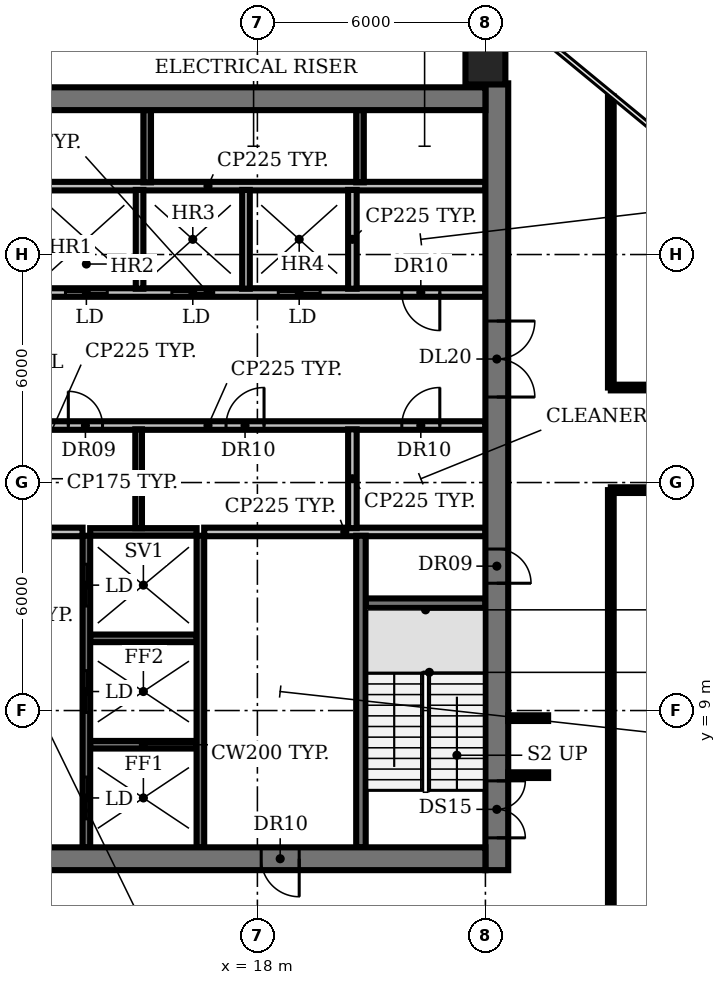
"""IFC4 building model, lengths in metres.
Left out: names, types, materials, properties, quantities, classifications, styles, units other than length and angle.
Written with IfcOpenShell. Run it as: python <this file> out.ifc"""

import sys

from ifc_helpers import new_model, si_unit, direction, frame, frame_2d, origin, origin_2d, place, context, subcontext, project, spatial, rectangle, circle, extrude, element, fill, save


model = new_model("IFC4")
c1 = context("Model", 3, precision=1e-05, world=origin(), true_north=direction((0.0, 1.0)))
c2 = subcontext(c1, "Body", "Model", "MODEL_VIEW")
j1 = project(units=[si_unit("LENGTHUNIT", "METRE"), si_unit("PLANEANGLEUNIT", "RADIAN")], contexts=[c1])
p1 = place(None, origin())
s1 = spatial("IfcSite", under=j1, at=p1, CompositionType="ELEMENT")
p2 = place(p1, origin())
s2 = spatial("IfcBuilding", under=s1, at=p2, CompositionType="ELEMENT")
p3 = place(p2, frame((0.0, 0.0, 192.8)))
s3 = spatial("IfcBuildingStorey", under=s2, at=p3, CompositionType="ELEMENT", Elevation=192.8)
p4 = place(p3, frame((24.0, 26.0, 0.0), z_axis=(0.0, 0.0, 1.0), x_axis=(1.0, 0.0, 0.0)))
e1 = element("IfcColumn", 1, at=p4, inside=s3, PredefinedType="COLUMN", context=c2, shape_type="SweptSolid", body=[
    extrude(circle(Radius=0.525, at=origin_2d()), origin(), (0.0, 0.0, 1.0), 3.2),
])
for number, where, z_axis, x_axis in (
    (2, (13.6, 8.1, 0.0), (0.0, 0.0, 1.0), (1.0, 0.0, 0.0)),
    (3, (13.6, 10.9, 0.0), (0.0, 0.0, 1.0), (1.0, 0.0, 0.0)),
):
    element("IfcWall", number, at=place(p3, frame(where, z_axis=z_axis, x_axis=x_axis)), inside=s3, PredefinedType="SHEAR", context=c2, shape_type="SweptSolid", body=[
        extrude(rectangle(XDim=2.8, YDim=0.2, at=frame_2d((1.4, 0.0))), origin(), (0.0, 0.0, 1.0), 3.8),
    ])
p5 = place(p3, frame((20.85, 11.825, 0.0), z_axis=(0.0, 0.0, 1.0), x_axis=(1.0, 0.0, 0.0)))
e4 = element("IfcWall", 4, at=p5, inside=s3, PredefinedType="SHEAR", context=c2, shape_type="SweptSolid", body=[
    extrude(rectangle(XDim=3.15, YDim=0.25, at=frame_2d((1.575, 0.0))), origin(), (0.0, 0.0, 1.0), 3.8),
])
p6 = place(p3, frame((9.4, 13.7, 0.0), z_axis=(0.0, 0.0, 1.0), x_axis=(1.0, 0.0, 0.0)))
e5 = element("IfcWall", 5, at=p6, inside=s3, PredefinedType="PARTITIONING", context=c2, shape_type="SweptSolid", body=[
    extrude(rectangle(XDim=4.0, YDim=0.225, at=frame_2d((2.0, 0.0))), origin(), (0.0, 0.0, 1.0), 3.8),
])
p7 = place(p3, frame((13.6, 13.7, 0.0), z_axis=(0.0, 0.0, 1.0), x_axis=(1.0, 0.0, 0.0)))
e6 = element("IfcWall", 6, at=p7, inside=s3, PredefinedType="SHEAR", context=c2, shape_type="SweptSolid", body=[
    extrude(rectangle(XDim=2.8, YDim=0.2, at=frame_2d((1.4, 0.0))), origin(), (0.0, 0.0, 1.0), 3.8),
])
p8 = place(p3, frame((16.6, 13.7, 0.0), z_axis=(0.0, 0.0, 1.0), x_axis=(1.0, 0.0, 0.0)))
e7 = element("IfcWall", 7, at=p8, inside=s3, PredefinedType="PARTITIONING", context=c2, shape_type="SweptSolid", body=[
    extrude(rectangle(XDim=7.4, YDim=0.225, at=frame_2d((3.7, 0.0))), origin(), (0.0, 0.0, 1.0), 3.8),
])
p9 = place(p3, frame((9.4, 16.5, 0.0), z_axis=(0.0, 0.0, 1.0), x_axis=(1.0, 0.0, 0.0)))
e8 = element("IfcWall", 8, at=p9, inside=s3, PredefinedType="PARTITIONING", context=c2, shape_type="SweptSolid", body=[
    extrude(rectangle(XDim=14.6, YDim=0.225, at=frame_2d((7.3, 0.0))), origin(), (0.0, 0.0, 1.0), 3.8),
])
p10 = place(p9, frame((0.85, 0.0, 0.0)))
e9 = element("IfcOpeningElement", 9, at=p10, cuts=e8, PredefinedType="OPENING", context=c2, shape_type="SweptSolid", body=[
    extrude(rectangle(XDim=0.9, YDim=2.1, at=frame_2d((0.45, 1.05))), frame((0.0, 0.123, 0.0), z_axis=(0.0, -1.0, 0.0), x_axis=(1.0, 0.0, 0.0)), (0.0, 0.0, 1.0), 0.245),
])
p11 = place(p9, frame((3.625, 0.0, 0.0)))
e10 = element("IfcOpeningElement", 10, at=p11, cuts=e8, PredefinedType="OPENING", context=c2, shape_type="SweptSolid", body=[
    extrude(rectangle(XDim=0.9, YDim=2.1, at=frame_2d((0.45, 1.05))), frame((0.0, 0.123, 0.0), z_axis=(0.0, -1.0, 0.0), x_axis=(1.0, 0.0, 0.0)), (0.0, 0.0, 1.0), 0.245),
])
p12 = place(p9, frame((7.775, 0.0, 0.0)))
e11 = element("IfcOpeningElement", 11, at=p12, cuts=e8, PredefinedType="OPENING", context=c2, shape_type="SweptSolid", body=[
    extrude(rectangle(XDim=1.0, YDim=2.1, at=frame_2d((0.5, 1.05))), frame((0.0, 0.123, 0.0), z_axis=(0.0, -1.0, 0.0), x_axis=(1.0, 0.0, 0.0)), (0.0, 0.0, 1.0), 0.245),
])
p13 = place(p9, frame((12.4, 0.0, 0.0)))
e12 = element("IfcOpeningElement", 12, at=p13, cuts=e8, PredefinedType="OPENING", context=c2, shape_type="SweptSolid", body=[
    extrude(rectangle(XDim=1.0, YDim=2.1, at=frame_2d((0.5, 1.05))), frame((0.0, 0.123, 0.0), z_axis=(0.0, -1.0, 0.0), x_axis=(1.0, 0.0, 0.0)), (0.0, 0.0, 1.0), 0.245),
])
p14 = place(p3, frame((24.0, 20.0, 0.0), z_axis=(0.0, 0.0, 1.0), x_axis=(-1.0, 0.0, 0.0)))
e13 = element("IfcWall", 13, at=p14, inside=s3, PredefinedType="PARTITIONING", context=c2, shape_type="SweptSolid", body=[
    extrude(rectangle(XDim=14.6, YDim=0.225, at=frame_2d((7.3, 0.0))), origin(), (0.0, 0.0, 1.0), 3.8),
])
p15 = place(p14, frame((12.75, 0.0, 0.0)))
e14 = element("IfcOpeningElement", 14, at=p15, cuts=e13, PredefinedType="OPENING", context=c2, shape_type="SweptSolid", body=[
    extrude(rectangle(XDim=1.1, YDim=2.1, at=frame_2d((0.55, 1.05))), frame((0.0, 0.123, 0.0), z_axis=(0.0, -1.0, 0.0), x_axis=(1.0, 0.0, 0.0)), (0.0, 0.0, 1.0), 0.245),
])
p16 = place(p14, frame((9.95, 0.0, 0.0)))
e15 = element("IfcOpeningElement", 15, at=p16, cuts=e13, PredefinedType="OPENING", context=c2, shape_type="SweptSolid", body=[
    extrude(rectangle(XDim=1.1, YDim=2.1, at=frame_2d((0.55, 1.05))), frame((0.0, 0.123, 0.0), z_axis=(0.0, -1.0, 0.0), x_axis=(1.0, 0.0, 0.0)), (0.0, 0.0, 1.0), 0.245),
])
p17 = place(p14, frame((7.15, 0.0, 0.0)))
e16 = element("IfcOpeningElement", 16, at=p17, cuts=e13, PredefinedType="OPENING", context=c2, shape_type="SweptSolid", body=[
    extrude(rectangle(XDim=1.1, YDim=2.1, at=frame_2d((0.55, 1.05))), frame((0.0, 0.123, 0.0), z_axis=(0.0, -1.0, 0.0), x_axis=(1.0, 0.0, 0.0)), (0.0, 0.0, 1.0), 0.245),
])
p18 = place(p14, frame((4.35, 0.0, 0.0)))
e17 = element("IfcOpeningElement", 17, at=p18, cuts=e13, PredefinedType="OPENING", context=c2, shape_type="SweptSolid", body=[
    extrude(rectangle(XDim=1.1, YDim=2.1, at=frame_2d((0.55, 1.05))), frame((0.0, 0.123, 0.0), z_axis=(0.0, -1.0, 0.0), x_axis=(1.0, 0.0, 0.0)), (0.0, 0.0, 1.0), 0.245),
])
p19 = place(p14, frame((1.2, 0.0, 0.0)))
e18 = element("IfcOpeningElement", 18, at=p19, cuts=e13, PredefinedType="OPENING", context=c2, shape_type="SweptSolid", body=[
    extrude(rectangle(XDim=1.0, YDim=2.1, at=frame_2d((0.5, 1.05))), frame((0.0, 0.123, 0.0), z_axis=(0.0, -1.0, 0.0), x_axis=(1.0, 0.0, 0.0)), (0.0, 0.0, 1.0), 0.245),
])
p20 = place(p3, frame((9.4, 22.8, 0.0), z_axis=(0.0, 0.0, 1.0), x_axis=(1.0, 0.0, 0.0)))
e19 = element("IfcWall", 19, at=p20, inside=s3, PredefinedType="PARTITIONING", context=c2, shape_type="SweptSolid", body=[
    extrude(rectangle(XDim=14.6, YDim=0.225, at=frame_2d((7.3, 0.0))), origin(), (0.0, 0.0, 1.0), 3.8),
])
p21 = place(p3, frame((13.5, 5.4, 0.0), z_axis=(0.0, 0.0, 1.0), x_axis=(0.0, 1.0, 0.0)))
e20 = element("IfcWall", 20, at=p21, inside=s3, PredefinedType="SHEAR", context=c2, shape_type="SweptSolid", body=[
    extrude(rectangle(XDim=8.2, YDim=0.2, at=frame_2d((4.1, 0.0))), origin(), (0.0, 0.0, 1.0), 3.8),
])
p22 = place(p21, frame((0.75, 0.0, 0.0)))
e21 = element("IfcOpeningElement", 21, at=p22, cuts=e20, PredefinedType="OPENING", context=c2, shape_type="SweptSolid", body=[
    extrude(rectangle(XDim=1.1, YDim=2.1, at=frame_2d((0.55, 1.05))), frame((0.0, 0.11, 0.0), z_axis=(0.0, -1.0, 0.0), x_axis=(1.0, 0.0, 0.0)), (0.0, 0.0, 1.0), 0.22),
])
p23 = place(p21, frame((3.55, 0.0, 0.0)))
e22 = element("IfcOpeningElement", 22, at=p23, cuts=e20, PredefinedType="OPENING", context=c2, shape_type="SweptSolid", body=[
    extrude(rectangle(XDim=1.1, YDim=2.1, at=frame_2d((0.55, 1.05))), frame((0.0, 0.11, 0.0), z_axis=(0.0, -1.0, 0.0), x_axis=(1.0, 0.0, 0.0)), (0.0, 0.0, 1.0), 0.22),
])
p24 = place(p21, frame((6.35, 0.0, 0.0)))
e23 = element("IfcOpeningElement", 23, at=p24, cuts=e20, PredefinedType="OPENING", context=c2, shape_type="SweptSolid", body=[
    extrude(rectangle(XDim=1.1, YDim=2.1, at=frame_2d((0.55, 1.05))), frame((0.0, 0.11, 0.0), z_axis=(0.0, -1.0, 0.0), x_axis=(1.0, 0.0, 0.0)), (0.0, 0.0, 1.0), 0.22),
])
p25 = place(p3, frame((14.875, 13.8, 0.0), z_axis=(0.0, 0.0, 1.0), x_axis=(0.0, 1.0, 0.0)))
e24 = element("IfcWall", 24, at=p25, inside=s3, PredefinedType="PARTITIONING", context=c2, shape_type="SweptSolid", body=[
    extrude(rectangle(XDim=2.6, YDim=0.175, at=frame_2d((1.3, 0.0))), origin(), (0.0, 0.0, 1.0), 3.8),
])
p26 = place(p3, frame((14.9, 20.1, 0.0), z_axis=(0.0, 0.0, 1.0), x_axis=(0.0, 1.0, 0.0)))
e25 = element("IfcWall", 25, at=p26, inside=s3, PredefinedType="SOLIDWALL", context=c2, shape_type="SweptSolid", body=[
    extrude(rectangle(XDim=2.6, YDim=0.2, at=frame_2d((1.3, 0.0))), origin(), (0.0, 0.0, 1.0), 3.8),
])
p27 = place(p3, frame((15.1, 22.9, 0.0), z_axis=(0.0, 0.0, 1.0), x_axis=(0.0, 1.0, 0.0)))
e26 = element("IfcWall", 26, at=p27, inside=s3, PredefinedType="SHEAR", context=c2, shape_type="SweptSolid", body=[
    extrude(rectangle(XDim=1.9, YDim=0.2, at=frame_2d((0.95, 0.0))), origin(), (0.0, 0.0, 1.0), 3.8),
])
p28 = place(p3, frame((16.5, 5.4, 0.0), z_axis=(0.0, 0.0, 1.0), x_axis=(0.0, 1.0, 0.0)))
e27 = element("IfcWall", 27, at=p28, inside=s3, PredefinedType="SHEAR", context=c2, shape_type="SweptSolid", body=[
    extrude(rectangle(XDim=8.2, YDim=0.2, at=frame_2d((4.1, 0.0))), origin(), (0.0, 0.0, 1.0), 3.8),
])
p29 = place(p3, frame((17.7, 20.1, 0.0), z_axis=(0.0, 0.0, 1.0), x_axis=(0.0, 1.0, 0.0)))
e28 = element("IfcWall", 28, at=p29, inside=s3, PredefinedType="SOLIDWALL", context=c2, shape_type="SweptSolid", body=[
    extrude(rectangle(XDim=2.6, YDim=0.2, at=frame_2d((1.3, 0.0))), origin(), (0.0, 0.0, 1.0), 3.8),
])
for number, where, z_axis, x_axis in (
    (29, (20.5, 13.8, 0.0), (0.0, 0.0, 1.0), (0.0, 1.0, 0.0)),
    (30, (20.5, 20.1, 0.0), (0.0, 0.0, 1.0), (0.0, 1.0, 0.0)),
):
    element("IfcWall", number, at=place(p3, frame(where, z_axis=z_axis, x_axis=x_axis)), inside=s3, PredefinedType="PARTITIONING", context=c2, shape_type="SweptSolid", body=[
        extrude(rectangle(XDim=2.6, YDim=0.225, at=frame_2d((1.3, 0.0))), origin(), (0.0, 0.0, 1.0), 3.8),
    ])
p30 = place(p3, frame((20.7, 22.9, 0.0), z_axis=(0.0, 0.0, 1.0), x_axis=(0.0, 1.0, 0.0)))
e31 = element("IfcWall", 31, at=p30, inside=s3, PredefinedType="SHEAR", context=c2, shape_type="SweptSolid", body=[
    extrude(rectangle(XDim=1.9, YDim=0.2, at=frame_2d((0.95, 0.0))), origin(), (0.0, 0.0, 1.0), 3.8),
])
p31 = place(p3, frame((20.725, 5.4, 0.0), z_axis=(0.0, 0.0, 1.0), x_axis=(0.0, 1.0, 0.0)))
e32 = element("IfcWall", 32, at=p31, inside=s3, PredefinedType="SHEAR", context=c2, shape_type="SweptSolid", body=[
    extrude(rectangle(XDim=8.2, YDim=0.25, at=frame_2d((4.1, 0.0))), origin(), (0.0, 0.0, 1.0), 3.8),
])
p32 = place(p3, frame((24.3, 25.505, 0.0), z_axis=(0.0, 0.0, 1.0), x_axis=(0.0, -1.0, 0.0)))
e33 = element("IfcWall", 33, at=p32, inside=s3, PredefinedType="SHEAR", context=c2, shape_type="SweptSolid", body=[
    extrude(rectangle(XDim=20.705, YDim=0.6, at=frame_2d((10.353, 0.0))), origin(), (0.0, 0.0, 1.0), 3.8),
])
p33 = place(p32, frame((18.355, 0.0, 0.0)))
e34 = element("IfcOpeningElement", 34, at=p33, cuts=e33, PredefinedType="OPENING", context=c2, shape_type="SweptSolid", body=[
    extrude(rectangle(XDim=1.5, YDim=2.1, at=frame_2d((0.75, 1.05))), frame((0.0, 0.31, 0.0), z_axis=(0.0, -1.0, 0.0), x_axis=(1.0, 0.0, 0.0)), (0.0, 0.0, 1.0), 0.62),
])
p34 = place(p32, frame((12.255, 0.0, 0.0)))
e35 = element("IfcOpeningElement", 35, at=p34, cuts=e33, PredefinedType="OPENING", context=c2, shape_type="SweptSolid", body=[
    extrude(rectangle(XDim=0.9, YDim=2.1, at=frame_2d((0.45, 1.05))), frame((0.0, 0.31, 0.0), z_axis=(0.0, -1.0, 0.0), x_axis=(1.0, 0.0, 0.0)), (0.0, 0.0, 1.0), 0.62),
])
p35 = place(p32, frame((6.255, 0.0, 0.0)))
e36 = element("IfcOpeningElement", 36, at=p35, cuts=e33, PredefinedType="OPENING", context=c2, shape_type="SweptSolid", body=[
    extrude(rectangle(XDim=2.0, YDim=2.1, at=frame_2d((1.0, 1.05))), frame((0.0, 0.31, 0.0), z_axis=(0.0, -1.0, 0.0), x_axis=(1.0, 0.0, 0.0)), (0.0, 0.0, 1.0), 0.62),
])
p36 = place(p3, frame((24.0, 5.1, 0.0), z_axis=(0.0, 0.0, 1.0), x_axis=(-1.0, 0.0, 0.0)))
e37 = element("IfcWall", 37, at=p36, inside=s3, PredefinedType="SHEAR", context=c2, shape_type="SweptSolid", body=[
    extrude(rectangle(XDim=18.0, YDim=0.6, at=frame_2d((9.0, 0.0))), origin(), (0.0, 0.0, 1.0), 3.8),
])
p37 = place(p36, frame((13.0, 0.0, 0.0)))
e38 = element("IfcOpeningElement", 38, at=p37, cuts=e37, PredefinedType="OPENING", context=c2, shape_type="SweptSolid", body=[
    extrude(rectangle(XDim=1.2, YDim=2.1, at=frame_2d((0.6, 1.05))), frame((0.0, 0.31, 0.0), z_axis=(0.0, -1.0, 0.0), x_axis=(1.0, 0.0, 0.0)), (0.0, 0.0, 1.0), 0.62),
])
p38 = place(p36, frame((4.9, 0.0, 0.0)))
e39 = element("IfcOpeningElement", 39, at=p38, cuts=e37, PredefinedType="OPENING", context=c2, shape_type="SweptSolid", body=[
    extrude(rectangle(XDim=1.0, YDim=2.1, at=frame_2d((0.5, 1.05))), frame((0.0, 0.31, 0.0), z_axis=(0.0, -1.0, 0.0), x_axis=(1.0, 0.0, 0.0)), (0.0, 0.0, 1.0), 0.62),
])
p39 = place(p3, frame((6.0, 25.1, 0.0), z_axis=(0.0, 0.0, 1.0), x_axis=(1.0, 0.0, 0.0)))
e40 = element("IfcWall", 40, at=p39, inside=s3, PredefinedType="SHEAR", context=c2, shape_type="SweptSolid", body=[
    extrude(rectangle(XDim=18.0, YDim=0.6, at=frame_2d((9.0, 0.0))), origin(), (0.0, 0.0, 1.0), 3.8),
])
for number, where, z_axis, x_axis in (
    (41, (24.6, 7.3, 0.0), (0.0, 0.0, 1.0), (1.0, 0.0, 0.0)),
    (42, (24.6, 8.8, 0.0), (0.0, 0.0, 1.0), (1.0, 0.0, 0.0)),
):
    element("IfcWall", number, at=place(p3, frame(where, z_axis=z_axis, x_axis=x_axis)), inside=s3, PredefinedType="PARTITIONING", context=c2, shape_type="SweptSolid", body=[
        extrude(rectangle(XDim=1.05, YDim=0.15, at=frame_2d((0.525, 0.0))), origin(), (0.0, 0.0, 1.0), 2.83),
    ])
p40 = place(p3, frame((27.3, 0.9, 0.0), z_axis=(0.0, 0.0, 1.0), x_axis=(0.0, 1.0, 0.0)))
e43 = element("IfcWall", 43, at=p40, inside=s3, PredefinedType="PARTITIONING", context=c2, shape_type="SweptSolid", body=[
    extrude(rectangle(XDim=13.9, YDim=0.15, at=frame_2d((6.95, 0.0))), origin(), (0.0, 0.0, 1.0), 2.83),
])
p41 = place(p3, frame((27.3, 14.8, 0.0), z_axis=(0.0, 0.0, 1.0), x_axis=(1.0, 0.0, 0.0)))
e44 = element("IfcWall", 44, at=p41, inside=s3, PredefinedType="PARTITIONING", context=c2, shape_type="SweptSolid", body=[
    extrude(rectangle(XDim=17.055, YDim=0.15, at=frame_2d((8.527, 0.0))), origin(), (0.0, 0.0, 1.0), 2.83),
])
p42 = place(p41, frame((8.0, 0.0, 0.0)))
e45 = element("IfcOpeningElement", 45, at=p42, cuts=e44, PredefinedType="OPENING", context=c2, shape_type="SweptSolid", body=[
    extrude(rectangle(XDim=1.2, YDim=2.1, at=frame_2d((0.6, 1.05))), frame((0.0, 0.085, 0.0), z_axis=(0.0, -1.0, 0.0), x_axis=(1.0, 0.0, 0.0)), (0.0, 0.0, 1.0), 0.17),
])
p43 = place(p3, frame((27.3, 17.5, 0.0), z_axis=(0.0, 0.0, 1.0), x_axis=(0.0, 1.0, 0.0)))
e46 = element("IfcWall", 46, at=p43, inside=s3, PredefinedType="PARTITIONING", context=c2, shape_type="SweptSolid", body=[
    extrude(rectangle(XDim=7.66, YDim=0.15, at=frame_2d((3.83, 0.0))), origin(), (0.0, 0.0, 1.0), 2.83),
])
p44 = place(p3, frame((27.3, 17.5, 0.0), z_axis=(0.0, 0.0, 1.0), x_axis=(1.0, 0.0, 0.0)))
e47 = element("IfcWall", 47, at=p44, inside=s3, PredefinedType="PARTITIONING", context=c2, shape_type="SweptSolid", body=[
    extrude(rectangle(XDim=15.96, YDim=0.15, at=frame_2d((7.98, 0.0))), origin(), (0.0, 0.0, 1.0), 2.83),
])
p45 = place(p44, frame((6.16, 0.0, 0.0)))
e48 = element("IfcOpeningElement", 48, at=p45, cuts=e47, PredefinedType="OPENING", context=c2, shape_type="SweptSolid", body=[
    extrude(rectangle(XDim=1.2, YDim=2.1, at=frame_2d((0.6, 1.05))), frame((0.0, 0.085, 0.0), z_axis=(0.0, -1.0, 0.0), x_axis=(1.0, 0.0, 0.0)), (0.0, 0.0, 1.0), 0.17),
])
p46 = place(p11, origin())
e49 = element("IfcDoor", 49, at=p46, inside=s3, OperationType="SINGLE_SWING_LEFT", PredefinedType="DOOR", context=c2, shape_type="SweptSolid", body=[
    extrude(rectangle(XDim=0.9, YDim=2.1, at=frame_2d((0.45, 1.05))), frame((0.0, 0.025, 0.0), z_axis=(0.0, -1.0, 0.0), x_axis=(1.0, 0.0, 0.0)), (0.0, 0.0, 1.0), 0.05),
])
fill(e10, e49)
p47 = place(p12, origin())
e50 = element("IfcDoor", 50, at=p47, inside=s3, OperationType="SINGLE_SWING_RIGHT", PredefinedType="DOOR", context=c2, shape_type="SweptSolid", body=[
    extrude(rectangle(XDim=1.0, YDim=2.1, at=frame_2d((0.5, 1.05))), frame((0.0, 0.025, 0.0), z_axis=(0.0, -1.0, 0.0), x_axis=(1.0, 0.0, 0.0)), (0.0, 0.0, 1.0), 0.05),
])
fill(e11, e50)
p48 = place(p13, origin())
e51 = element("IfcDoor", 51, at=p48, inside=s3, OperationType="SINGLE_SWING_RIGHT", PredefinedType="DOOR", context=c2, shape_type="SweptSolid", body=[
    extrude(rectangle(XDim=1.0, YDim=2.1, at=frame_2d((0.5, 1.05))), frame((0.0, 0.025, 0.0), z_axis=(0.0, -1.0, 0.0), x_axis=(1.0, 0.0, 0.0)), (0.0, 0.0, 1.0), 0.05),
])
fill(e12, e51)
p49 = place(p16, origin())
e52 = element("IfcDoor", 52, at=p49, inside=s3, OperationType="DOUBLE_DOOR_SLIDING", PredefinedType="DOOR", context=c2, shape_type="SweptSolid", body=[
    extrude(rectangle(XDim=1.1, YDim=2.1, at=frame_2d((0.55, 1.05))), frame((0.0, 0.025, 0.0), z_axis=(0.0, -1.0, 0.0), x_axis=(1.0, 0.0, 0.0)), (0.0, 0.0, 1.0), 0.05),
])
fill(e15, e52)
p50 = place(p17, origin())
e53 = element("IfcDoor", 53, at=p50, inside=s3, OperationType="DOUBLE_DOOR_SLIDING", PredefinedType="DOOR", context=c2, shape_type="SweptSolid", body=[
    extrude(rectangle(XDim=1.1, YDim=2.1, at=frame_2d((0.55, 1.05))), frame((0.0, 0.025, 0.0), z_axis=(0.0, -1.0, 0.0), x_axis=(1.0, 0.0, 0.0)), (0.0, 0.0, 1.0), 0.05),
])
fill(e16, e53)
p51 = place(p18, origin())
e54 = element("IfcDoor", 54, at=p51, inside=s3, OperationType="DOUBLE_DOOR_SLIDING", PredefinedType="DOOR", context=c2, shape_type="SweptSolid", body=[
    extrude(rectangle(XDim=1.1, YDim=2.1, at=frame_2d((0.55, 1.05))), frame((0.0, 0.025, 0.0), z_axis=(0.0, -1.0, 0.0), x_axis=(1.0, 0.0, 0.0)), (0.0, 0.0, 1.0), 0.05),
])
fill(e17, e54)
p52 = place(p19, origin())
e55 = element("IfcDoor", 55, at=p52, inside=s3, OperationType="SINGLE_SWING_LEFT", PredefinedType="DOOR", context=c2, shape_type="SweptSolid", body=[
    extrude(rectangle(XDim=1.0, YDim=2.1, at=frame_2d((0.5, 1.05))), frame((0.0, 0.025, 0.0), z_axis=(0.0, -1.0, 0.0), x_axis=(1.0, 0.0, 0.0)), (0.0, 0.0, 1.0), 0.05),
])
fill(e18, e55)
p53 = place(p22, origin())
e56 = element("IfcDoor", 56, at=p53, inside=s3, OperationType="DOUBLE_DOOR_SLIDING", PredefinedType="DOOR", context=c2, shape_type="SweptSolid", body=[
    extrude(rectangle(XDim=1.1, YDim=2.1, at=frame_2d((0.55, 1.05))), frame((0.0, 0.025, 0.0), z_axis=(0.0, -1.0, 0.0), x_axis=(1.0, 0.0, 0.0)), (0.0, 0.0, 1.0), 0.05),
])
fill(e21, e56)
p54 = place(p23, origin())
e57 = element("IfcDoor", 57, at=p54, inside=s3, OperationType="DOUBLE_DOOR_SLIDING", PredefinedType="DOOR", context=c2, shape_type="SweptSolid", body=[
    extrude(rectangle(XDim=1.1, YDim=2.1, at=frame_2d((0.55, 1.05))), frame((0.0, 0.025, 0.0), z_axis=(0.0, -1.0, 0.0), x_axis=(1.0, 0.0, 0.0)), (0.0, 0.0, 1.0), 0.05),
])
fill(e22, e57)
p55 = place(p24, origin())
e58 = element("IfcDoor", 58, at=p55, inside=s3, OperationType="DOUBLE_DOOR_SLIDING", PredefinedType="DOOR", context=c2, shape_type="SweptSolid", body=[
    extrude(rectangle(XDim=1.1, YDim=2.1, at=frame_2d((0.55, 1.05))), frame((0.0, 0.025, 0.0), z_axis=(0.0, -1.0, 0.0), x_axis=(1.0, 0.0, 0.0)), (0.0, 0.0, 1.0), 0.05),
])
fill(e23, e58)
p56 = place(p33, origin())
e59 = element("IfcDoor", 59, at=p56, inside=s3, OperationType="DOUBLE_DOOR_SINGLE_SWING", PredefinedType="DOOR", context=c2, shape_type="SweptSolid", body=[
    extrude(rectangle(XDim=1.5, YDim=2.1, at=frame_2d((0.75, 1.05))), frame((0.0, 0.025, 0.0), z_axis=(0.0, -1.0, 0.0), x_axis=(1.0, 0.0, 0.0)), (0.0, 0.0, 1.0), 0.05),
])
fill(e34, e59)
p57 = place(p34, origin())
e60 = element("IfcDoor", 60, at=p57, inside=s3, OperationType="SINGLE_SWING_RIGHT", PredefinedType="DOOR", context=c2, shape_type="SweptSolid", body=[
    extrude(rectangle(XDim=0.9, YDim=2.1, at=frame_2d((0.45, 1.05))), frame((0.0, -0.24, 0.0), z_axis=(0.0, -1.0, 0.0), x_axis=(1.0, 0.0, 0.0)), (0.0, 0.0, 1.0), 0.05),
])
fill(e35, e60)
p58 = place(p35, origin())
e61 = element("IfcDoor", 61, at=p58, inside=s3, OperationType="DOUBLE_DOOR_SINGLE_SWING", PredefinedType="DOOR", context=c2, shape_type="SweptSolid", body=[
    extrude(rectangle(XDim=2.0, YDim=2.1, at=frame_2d((1.0, 1.05))), frame((0.0, 0.025, 0.0), z_axis=(0.0, -1.0, 0.0), x_axis=(1.0, 0.0, 0.0)), (0.0, 0.0, 1.0), 0.05),
])
fill(e36, e61)
p59 = place(p38, origin())
e62 = element("IfcDoor", 62, at=p59, inside=s3, OperationType="SINGLE_SWING_LEFT", PredefinedType="DOOR", context=c2, shape_type="SweptSolid", body=[
    extrude(rectangle(XDim=1.0, YDim=2.1, at=frame_2d((0.5, 1.05))), frame((0.0, -0.24, 0.0), z_axis=(0.0, -1.0, 0.0), x_axis=(1.0, 0.0, 0.0)), (0.0, 0.0, 1.0), 0.05),
])
fill(e39, e62)
save(model, sys.argv[1])
